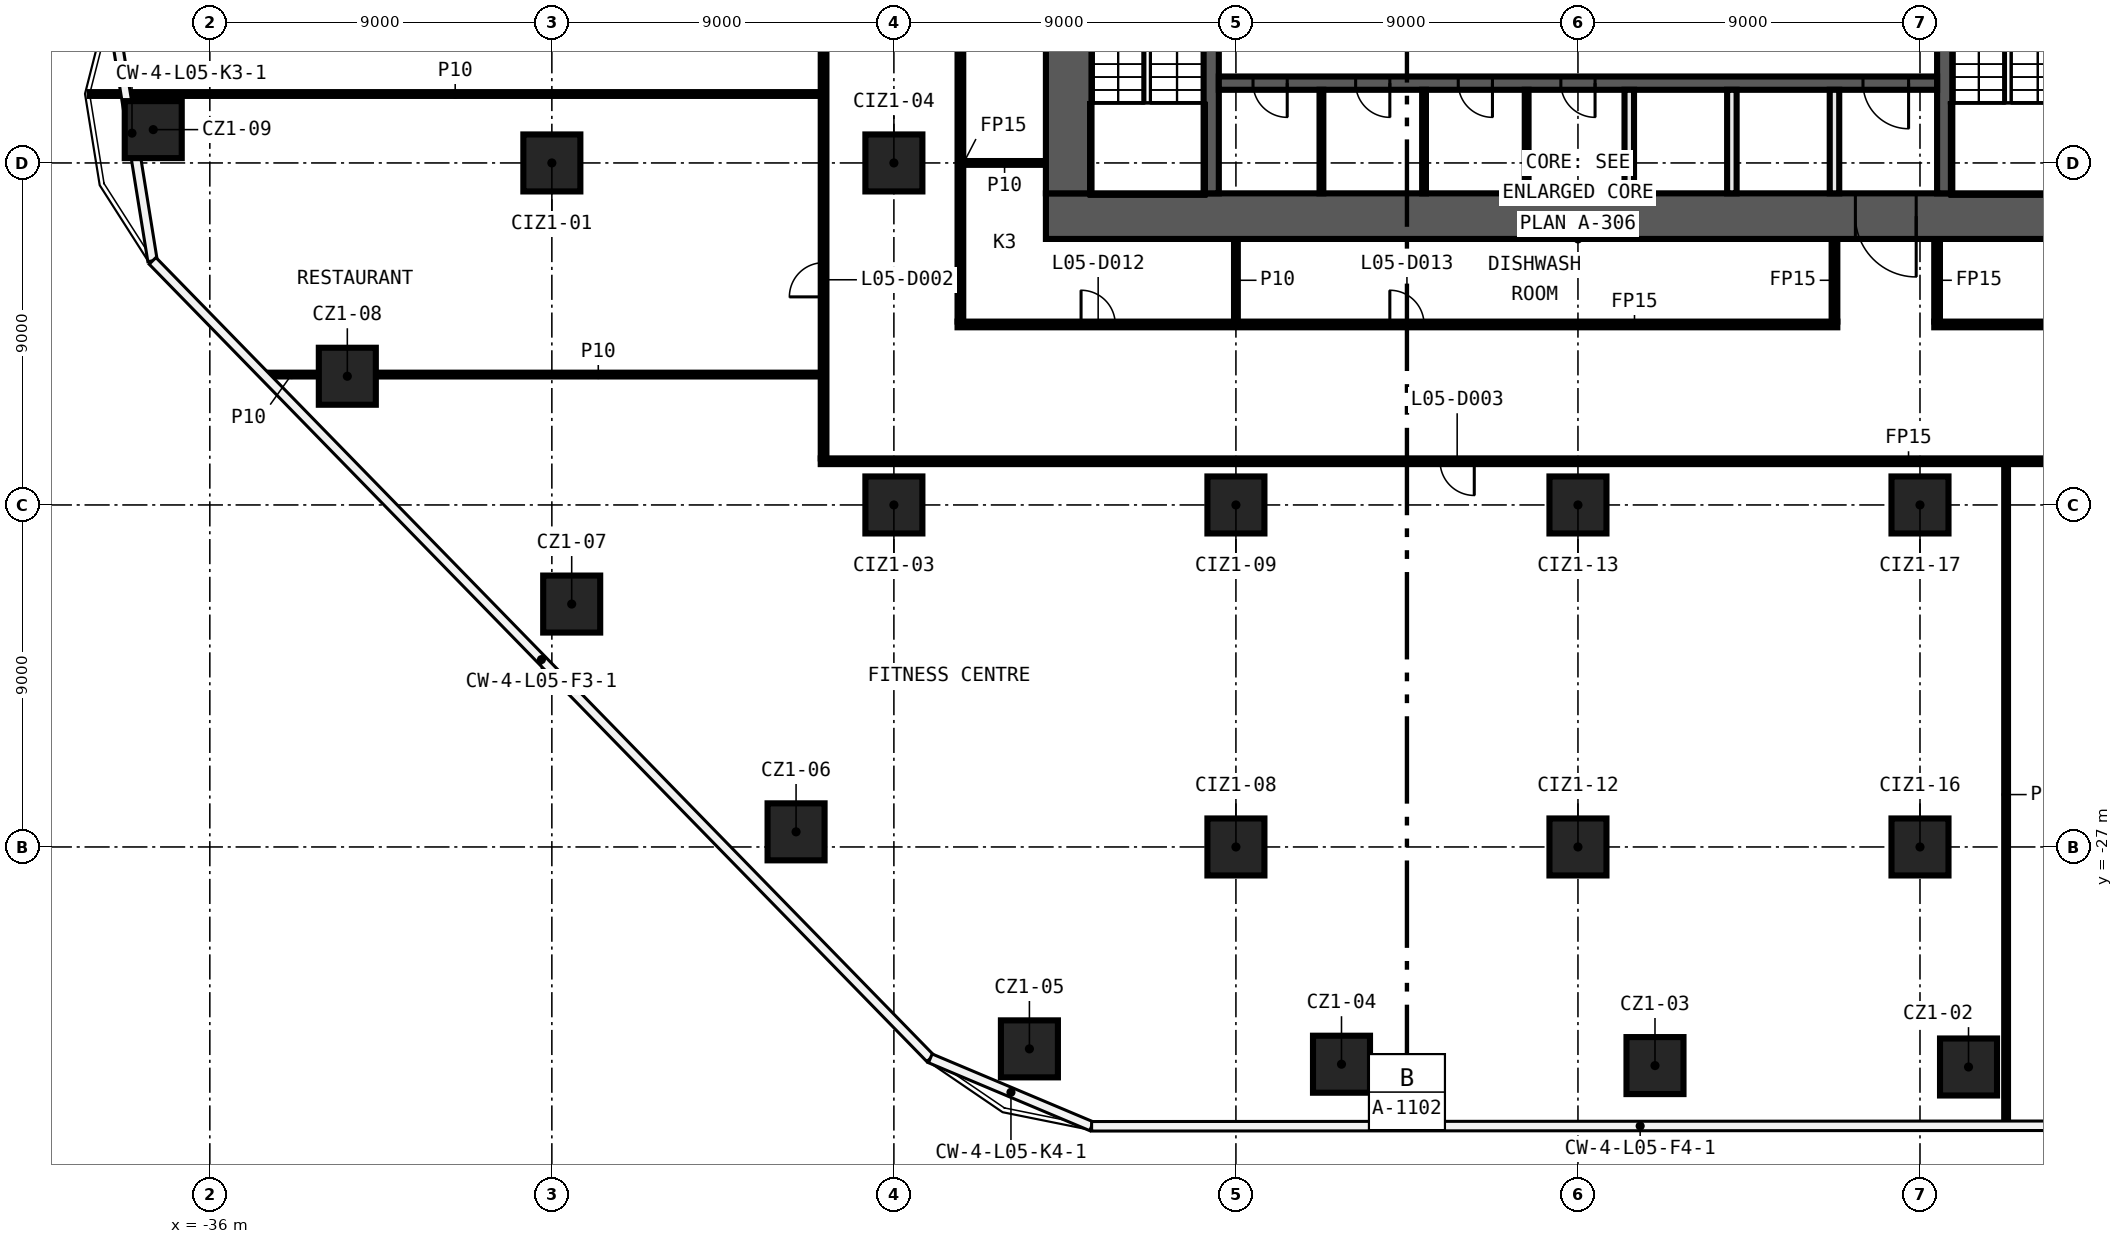
"""IFC4 building model, lengths in metres.
Left out: names, types, materials, properties, quantities, classifications, styles, units other than length and angle.
Written with IfcOpenShell. Run it as: python <this file> out.ifc"""

import sys

from ifc_helpers import new_model, si_unit, direction, frame, frame_2d, origin, origin_2d, place, context, subcontext, project, spatial, rectangle, extrude, element, fill, save


model = new_model("IFC4")
c1 = context("Model", 3, precision=1e-05, world=origin(), true_north=direction((0.0, 1.0)))
c2 = subcontext(c1, "Body", "Model", "MODEL_VIEW")
j1 = project(units=[si_unit("LENGTHUNIT", "METRE"), si_unit("PLANEANGLEUNIT", "RADIAN")], contexts=[c1])
p1 = place(None, origin())
s1 = spatial("IfcSite", under=j1, at=p1, CompositionType="ELEMENT")
p2 = place(p1, origin())
s2 = spatial("IfcBuilding", under=s1, at=p2, CompositionType="ELEMENT")
p3 = place(p2, frame((0.0, 0.0, 38.0)))
s3 = spatial("IfcBuildingStorey", under=s2, at=p3, CompositionType="ELEMENT", Elevation=38.0)
for number, where, z_axis, x_axis in (
    (1, (10.277, -32.79, 0.0), (0.0, 0.0, 1.0), (1.0, 0.0, 0.0)),
    (2, (2.027, -32.753, 0.0), (0.0, 0.0, 1.0), (1.0, 0.0, 0.0)),
    (3, (-6.222, -32.717, 0.0), (0.0, 0.0, 1.0), (1.0, 0.0, 0.0)),
    (4, (-14.434, -32.313, 0.0), (0.0, 0.0, 1.0), (1.0, 0.0, 0.0)),
    (5, (-20.574, -26.602, 0.0), (0.0, 0.0, 1.0), (1.0, 0.0, 0.0)),
    (6, (-26.478, -20.608, 0.0), (0.0, 0.0, 1.0), (1.0, 0.0, 0.0)),
    (7, (-32.382, -14.613, 0.0), (0.0, 0.0, 1.0), (1.0, 0.0, 0.0)),
    (8, (-37.489, -8.123, 0.0), (0.0, 0.0, 1.0), (1.0, 0.0, 0.0)),
    (9, (-27.0, -9.0, 0.0), (0.0, 0.0, 1.0), (1.0, 0.0, 0.0)),
    (10, (-18.0, -18.0, 0.0), (0.0, 0.0, 1.0), (1.0, 0.0, 0.0)),
    (11, (-18.0, -9.0, 0.0), (0.0, 0.0, 1.0), (1.0, 0.0, 0.0)),
    (12, (-9.0, -27.0, 0.0), (0.0, 0.0, 1.0), (1.0, 0.0, 0.0)),
    (13, (-9.0, -18.0, 0.0), (0.0, 0.0, 1.0), (1.0, 0.0, 0.0)),
    (14, (0.0, -27.0, 0.0), (0.0, 0.0, 1.0), (1.0, 0.0, 0.0)),
    (15, (0.0, -18.0, 0.0), (0.0, 0.0, 1.0), (1.0, 0.0, 0.0)),
    (16, (9.0, -27.0, 0.0), (0.0, 0.0, 1.0), (1.0, 0.0, 0.0)),
    (17, (9.0, -18.0, 0.0), (0.0, 0.0, 1.0), (1.0, 0.0, 0.0)),
):
    element("IfcColumn", number, at=place(p3, frame(where, z_axis=z_axis, x_axis=x_axis)), inside=s3, PredefinedType="COLUMN", context=c2, shape_type="SweptSolid", body=[
        extrude(rectangle(XDim=1.5, YDim=1.5, at=origin_2d()), origin(), (0.0, 0.0, 1.0), 5.6),
    ])
p4 = place(p3, frame((19.925, -16.85, 0.0), z_axis=(0.0, 0.0, 1.0), x_axis=(-1.0, 0.0, 0.0)))
e18 = element("IfcWall", 18, at=p4, inside=s3, PredefinedType="PARTITIONING", context=c2, shape_type="SweptSolid", body=[
    extrude(rectangle(XDim=39.85, YDim=0.15, at=frame_2d((19.925, 0.0))), origin(), (0.0, 0.0, 1.0), 5.6),
])
p5 = place(p4, frame((22.653, 0.0, 0.0)))
e19 = element("IfcOpeningElement", 19, at=p5, cuts=e18, PredefinedType="OPENING", context=c2, shape_type="SweptSolid", body=[
    extrude(rectangle(XDim=0.9, YDim=2.1, at=frame_2d((0.45, 1.05))), frame((0.0, 0.085, 0.0), z_axis=(0.0, -1.0, 0.0), x_axis=(1.0, 0.0, 0.0)), (0.0, 0.0, 1.0), 0.17),
])
p6 = place(p3, frame((-34.561, -14.569, 0.0), z_axis=(0.0, 0.0, 1.0), x_axis=(1.0, 0.0, 0.0)))
e20 = element("IfcWall", 20, at=p6, inside=s3, PredefinedType="PARTITIONING", context=c2, shape_type="SweptSolid", body=[
    extrude(rectangle(XDim=1.429, YDim=0.1, at=frame_2d((0.714, 0.0))), origin(), (0.0, 0.0, 1.0), 5.6),
])
p7 = place(p3, frame((-31.632, -14.569, 0.0), z_axis=(0.0, 0.0, 1.0), x_axis=(1.0, 0.0, 0.0)))
e21 = element("IfcWall", 21, at=p7, inside=s3, PredefinedType="PARTITIONING", context=c2, shape_type="SweptSolid", body=[
    extrude(rectangle(XDim=11.707, YDim=0.1, at=frame_2d((5.854, 0.0))), origin(), (0.0, 0.0, 1.0), 5.6),
])
p8 = place(p3, frame((-16.325, -13.25, 0.0), z_axis=(0.0, 0.0, 1.0), x_axis=(1.0, 0.0, 0.0)))
e22 = element("IfcWall", 22, at=p8, inside=s3, PredefinedType="PARTITIONING", context=c2, shape_type="SweptSolid", body=[
    extrude(rectangle(XDim=23.15, YDim=0.15, at=frame_2d((11.575, 0.0))), origin(), (0.0, 0.0, 1.0), 5.6),
])
p9 = place(p8, frame((3.25, 0.0, 0.0)))
e23 = element("IfcOpeningElement", 23, at=p9, cuts=e22, PredefinedType="OPENING", context=c2, shape_type="SweptSolid", body=[
    extrude(rectangle(XDim=0.9, YDim=2.1, at=frame_2d((0.45, 1.05))), frame((0.0, 0.085, 0.0), z_axis=(0.0, -1.0, 0.0), x_axis=(1.0, 0.0, 0.0)), (0.0, 0.0, 1.0), 0.17),
])
p10 = place(p8, frame((11.375, 0.0, 0.0)))
e24 = element("IfcOpeningElement", 24, at=p10, cuts=e22, PredefinedType="OPENING", context=c2, shape_type="SweptSolid", body=[
    extrude(rectangle(XDim=0.9, YDim=2.1, at=frame_2d((0.45, 1.05))), frame((0.0, 0.085, 0.0), z_axis=(0.0, -1.0, 0.0), x_axis=(1.0, 0.0, 0.0)), (0.0, 0.0, 1.0), 0.17),
])
p11 = place(p3, frame((9.375, -13.25, 0.0), z_axis=(0.0, 0.0, 1.0), x_axis=(1.0, 0.0, 0.0)))
e25 = element("IfcWall", 25, at=p11, inside=s3, PredefinedType="PARTITIONING", context=c2, shape_type="SweptSolid", body=[
    extrude(rectangle(XDim=6.95, YDim=0.15, at=frame_2d((3.475, 0.0))), origin(), (0.0, 0.0, 1.0), 5.6),
])
p12 = place(p3, frame((-16.175, -9.0, 0.0), z_axis=(0.0, 0.0, 1.0), x_axis=(1.0, 0.0, 0.0)))
e26 = element("IfcWall", 26, at=p12, inside=s3, PredefinedType="PARTITIONING", context=c2, shape_type="SweptSolid", body=[
    extrude(rectangle(XDim=2.175, YDim=0.1, at=frame_2d((1.087, 0.0))), origin(), (0.0, 0.0, 1.0), 5.6),
])
p13 = place(p3, frame((-39.162, -7.186, 0.0), z_axis=(0.0, 0.0, 1.0), x_axis=(1.0, 0.0, 0.0)))
e27 = element("IfcWall", 27, at=p13, inside=s3, PredefinedType="PARTITIONING", context=c2, shape_type="SweptSolid", body=[
    extrude(rectangle(XDim=19.237, YDim=0.1, at=frame_2d((9.618, 0.0))), origin(), (0.0, 0.0, 1.0), 5.6),
])
p14 = place(p3, frame((11.266, -34.318, 0.0), z_axis=(0.0, 0.0, 1.0), x_axis=(0.0, 1.0, 0.0)))
e28 = element("IfcWall", 28, at=p14, inside=s3, PredefinedType="PARTITIONING", context=c2, shape_type="SweptSolid", body=[
    extrude(rectangle(XDim=17.393, YDim=0.1, at=frame_2d((8.696, 0.0))), origin(), (0.0, 0.0, 1.0), 5.6),
])
for number, where, z_axis, x_axis in (
    (29, (9.45, -13.175, 0.0), (0.0, 0.0, 1.0), (0.0, 1.0, 0.0)),
    (30, (6.75, -13.175, 0.0), (0.0, 0.0, 1.0), (0.0, 1.0, 0.0)),
):
    element("IfcWall", number, at=place(p3, frame(where, z_axis=z_axis, x_axis=x_axis)), inside=s3, PredefinedType="PARTITIONING", context=c2, shape_type="SweptSolid", body=[
        extrude(rectangle(XDim=2.175, YDim=0.15, at=frame_2d((1.087, 0.0))), origin(), (0.0, 0.0, 1.0), 5.6),
    ])
p15 = place(p3, frame((-9.0, -13.175, 0.0), z_axis=(0.0, 0.0, 1.0), x_axis=(0.0, 1.0, 0.0)))
e31 = element("IfcWall", 31, at=p15, inside=s3, PredefinedType="PARTITIONING", context=c2, shape_type="SweptSolid", body=[
    extrude(rectangle(XDim=2.175, YDim=0.1, at=frame_2d((1.087, 0.0))), origin(), (0.0, 0.0, 1.0), 5.6),
])
p16 = place(p3, frame((-16.25, 13.175, 0.0), z_axis=(0.0, 0.0, 1.0), x_axis=(0.0, -1.0, 0.0)))
e32 = element("IfcWall", 32, at=p16, inside=s3, PredefinedType="PARTITIONING", context=c2, shape_type="SweptSolid", body=[
    extrude(rectangle(XDim=26.35, YDim=0.15, at=frame_2d((13.175, 0.0))), origin(), (0.0, 0.0, 1.0), 5.6),
])
p17 = place(p16, frame((17.225, 0.0, 0.0)))
e33 = element("IfcOpeningElement", 33, at=p17, cuts=e32, PredefinedType="OPENING", context=c2, shape_type="SweptSolid", body=[
    extrude(rectangle(XDim=0.9, YDim=2.1, at=frame_2d((0.45, 1.05))), frame((0.0, 0.085, 0.0), z_axis=(0.0, -1.0, 0.0), x_axis=(1.0, 0.0, 0.0)), (0.0, 0.0, 1.0), 0.17),
])
p18 = place(p16, frame((8.225, 0.0, 0.0)))
e34 = element("IfcOpeningElement", 34, at=p18, cuts=e32, PredefinedType="OPENING", context=c2, shape_type="SweptSolid", body=[
    extrude(rectangle(XDim=0.9, YDim=2.1, at=frame_2d((0.45, 1.05))), frame((0.0, 0.085, 0.0), z_axis=(0.0, -1.0, 0.0), x_axis=(1.0, 0.0, 0.0)), (0.0, 0.0, 1.0), 0.17),
])
p19 = place(p3, frame((-19.85, -16.775, 0.0), z_axis=(0.0, 0.0, 1.0), x_axis=(0.0, 1.0, 0.0)))
e35 = element("IfcWall", 35, at=p19, inside=s3, PredefinedType="PARTITIONING", context=c2, shape_type="SweptSolid", body=[
    extrude(rectangle(XDim=33.55, YDim=0.15, at=frame_2d((16.775, 0.0))), origin(), (0.0, 0.0, 1.0), 5.6),
])
p20 = place(p19, frame((19.392, 0.0, 0.0)))
e36 = element("IfcOpeningElement", 36, at=p20, cuts=e35, PredefinedType="OPENING", context=c2, shape_type="SweptSolid", body=[
    extrude(rectangle(XDim=0.9, YDim=2.1, at=frame_2d((0.45, 1.05))), frame((0.0, 0.085, 0.0), z_axis=(0.0, -1.0, 0.0), x_axis=(1.0, 0.0, 0.0)), (0.0, 0.0, 1.0), 0.17),
])
p21 = place(p19, frame((4.251, 0.0, 0.0)))
e37 = element("IfcOpeningElement", 37, at=p21, cuts=e35, PredefinedType="OPENING", context=c2, shape_type="SweptSolid", body=[
    extrude(rectangle(XDim=0.9, YDim=2.1, at=frame_2d((0.45, 1.05))), frame((0.0, 0.085, 0.0), z_axis=(0.0, -1.0, 0.0), x_axis=(1.0, 0.0, 0.0)), (0.0, 0.0, 1.0), 0.17),
])
p22 = place(p19, frame((28.629, 0.0, 0.0)))
e38 = element("IfcOpeningElement", 38, at=p22, cuts=e35, PredefinedType="OPENING", context=c2, shape_type="SweptSolid", body=[
    extrude(rectangle(XDim=0.9, YDim=2.1, at=frame_2d((0.45, 1.05))), frame((0.0, 0.085, 0.0), z_axis=(0.0, -1.0, 0.0), x_axis=(1.0, 0.0, 0.0)), (0.0, 0.0, 1.0), 0.17),
])
p23 = place(p3, frame((14.0, -10.4, 0.0), z_axis=(0.0, 0.0, 1.0), x_axis=(-1.0, 0.0, 0.0)))
e39 = element("IfcWall", 39, at=p23, inside=s3, PredefinedType="SHEAR", context=c2, shape_type="SweptSolid", body=[
    extrude(rectangle(XDim=28.0, YDim=1.2, at=frame_2d((14.0, 0.0))), origin(), (0.0, 0.0, 1.0), 5.6),
])
p24 = place(p23, frame((5.1, 0.0, 0.0)))
e40 = element("IfcOpeningElement", 40, at=p24, cuts=e39, PredefinedType="OPENING", context=c2, shape_type="SweptSolid", body=[
    extrude(rectangle(XDim=1.6, YDim=2.1, at=frame_2d((0.8, 1.05))), frame((0.0, 0.61, 0.0), z_axis=(0.0, -1.0, 0.0), x_axis=(1.0, 0.0, 0.0)), (0.0, 0.0, 1.0), 1.22),
])
p25 = place(p3, frame((-13.4, -9.8, 0.0), z_axis=(0.0, 0.0, 1.0), x_axis=(0.0, 1.0, 0.0)))
e41 = element("IfcWall", 41, at=p25, inside=s3, PredefinedType="SHEAR", context=c2, shape_type="SweptSolid", body=[
    extrude(rectangle(XDim=19.6, YDim=1.2, at=frame_2d((9.8, 0.0))), origin(), (0.0, 0.0, 1.0), 5.6),
])
p26 = place(p3, frame((9.65, -2.3, 0.0), z_axis=(0.0, 0.0, 1.0), x_axis=(0.0, -1.0, 0.0)))
e42 = element("IfcWall", 42, at=p26, inside=s3, PredefinedType="SHEAR", context=c2, shape_type="SweptSolid", body=[
    extrude(rectangle(XDim=7.5, YDim=0.4, at=frame_2d((3.75, 0.0))), origin(), (0.0, 0.0, 1.0), 5.6),
])
p27 = place(p26, frame((1.2, 0.0, 0.0)))
e43 = element("IfcOpeningElement", 43, at=p27, cuts=e42, PredefinedType="OPENING", context=c2, shape_type="SweptSolid", body=[
    extrude(rectangle(XDim=1.2, YDim=2.1, at=frame_2d((0.6, 1.05))), frame((0.0, 0.21, 0.0), z_axis=(0.0, -1.0, 0.0), x_axis=(1.0, 0.0, 0.0)), (0.0, 0.0, 1.0), 0.42),
])
p28 = place(p3, frame((-9.65, -9.8, 0.0), z_axis=(0.0, 0.0, 1.0), x_axis=(0.0, 1.0, 0.0)))
e44 = element("IfcWall", 44, at=p28, inside=s3, PredefinedType="SHEAR", context=c2, shape_type="SweptSolid", body=[
    extrude(rectangle(XDim=7.5, YDim=0.4, at=frame_2d((3.75, 0.0))), origin(), (0.0, 0.0, 1.0), 5.6),
])
p29 = place(p28, frame((5.1, 0.0, 0.0)))
e45 = element("IfcOpeningElement", 45, at=p29, cuts=e44, PredefinedType="OPENING", context=c2, shape_type="SweptSolid", body=[
    extrude(rectangle(XDim=1.2, YDim=2.1, at=frame_2d((0.6, 1.05))), frame((0.0, 0.21, 0.0), z_axis=(0.0, -1.0, 0.0), x_axis=(1.0, 0.0, 0.0)), (0.0, 0.0, 1.0), 0.42),
])
p30 = place(p3, frame((9.45, -6.9, 0.0), z_axis=(0.0, 0.0, 1.0), x_axis=(-1.0, 0.0, 0.0)))
e46 = element("IfcWall", 46, at=p30, inside=s3, PredefinedType="SHEAR", context=c2, shape_type="SweptSolid", body=[
    extrude(rectangle(XDim=18.9, YDim=0.35, at=frame_2d((9.45, 0.0))), origin(), (0.0, 0.0, 1.0), 5.6),
])
p31 = place(p30, frame((0.75, 0.0, 0.0)))
e47 = element("IfcOpeningElement", 47, at=p31, cuts=e46, PredefinedType="OPENING", context=c2, shape_type="SweptSolid", body=[
    extrude(rectangle(XDim=1.2, YDim=2.1, at=frame_2d((0.6, 1.05))), frame((0.0, 0.185, 0.0), z_axis=(0.0, -1.0, 0.0), x_axis=(1.0, 0.0, 0.0)), (0.0, 0.0, 1.0), 0.37),
])
p32 = place(p30, frame((17.1, 0.0, 0.0)))
e48 = element("IfcOpeningElement", 48, at=p32, cuts=e46, PredefinedType="OPENING", context=c2, shape_type="SweptSolid", body=[
    extrude(rectangle(XDim=0.9, YDim=2.1, at=frame_2d((0.45, 1.05))), frame((0.0, 0.185, 0.0), z_axis=(0.0, -1.0, 0.0), x_axis=(1.0, 0.0, 0.0)), (0.0, 0.0, 1.0), 0.37),
])
p33 = place(p30, frame((14.4, 0.0, 0.0)))
e49 = element("IfcOpeningElement", 49, at=p33, cuts=e46, PredefinedType="OPENING", context=c2, shape_type="SweptSolid", body=[
    extrude(rectangle(XDim=0.9, YDim=2.1, at=frame_2d((0.45, 1.05))), frame((0.0, 0.185, 0.0), z_axis=(0.0, -1.0, 0.0), x_axis=(1.0, 0.0, 0.0)), (0.0, 0.0, 1.0), 0.37),
])
p34 = place(p30, frame((11.7, 0.0, 0.0)))
e50 = element("IfcOpeningElement", 50, at=p34, cuts=e46, PredefinedType="OPENING", context=c2, shape_type="SweptSolid", body=[
    extrude(rectangle(XDim=0.9, YDim=2.1, at=frame_2d((0.45, 1.05))), frame((0.0, 0.185, 0.0), z_axis=(0.0, -1.0, 0.0), x_axis=(1.0, 0.0, 0.0)), (0.0, 0.0, 1.0), 0.37),
])
p35 = place(p30, frame((9.0, 0.0, 0.0)))
e51 = element("IfcOpeningElement", 51, at=p35, cuts=e46, PredefinedType="OPENING", context=c2, shape_type="SweptSolid", body=[
    extrude(rectangle(XDim=0.9, YDim=2.1, at=frame_2d((0.45, 1.05))), frame((0.0, 0.185, 0.0), z_axis=(0.0, -1.0, 0.0), x_axis=(1.0, 0.0, 0.0)), (0.0, 0.0, 1.0), 0.37),
])
for number, where, z_axis, x_axis in (
    (52, (6.75, -9.8, 0.0), (0.0, 0.0, 1.0), (0.0, 1.0, 0.0)),
    (53, (4.05, -9.8, 0.0), (0.0, 0.0, 1.0), (0.0, 1.0, 0.0)),
    (54, (1.35, -9.8, 0.0), (0.0, 0.0, 1.0), (0.0, 1.0, 0.0)),
):
    element("IfcWall", number, at=place(p3, frame(where, z_axis=z_axis, x_axis=x_axis)), inside=s3, PredefinedType="SOLIDWALL", context=c2, shape_type="SweptSolid", body=[
        extrude(rectangle(XDim=2.725, YDim=0.25, at=frame_2d((1.363, 0.0))), origin(), (0.0, 0.0, 1.0), 5.6),
    ])
for number, where, z_axis, x_axis in (
    (55, (-1.35, -9.8, 0.0), (0.0, 0.0, 1.0), (0.0, 1.0, 0.0)),
    (56, (-4.05, -9.8, 0.0), (0.0, 0.0, 1.0), (0.0, 1.0, 0.0)),
    (57, (-6.75, -9.8, 0.0), (0.0, 0.0, 1.0), (0.0, 1.0, 0.0)),
):
    element("IfcWall", number, at=place(p3, frame(where, z_axis=z_axis, x_axis=x_axis)), inside=s3, PredefinedType="PARTITIONING", context=c2, shape_type="SweptSolid", body=[
        extrude(rectangle(XDim=2.725, YDim=0.1, at=frame_2d((1.363, 0.0))), origin(), (0.0, 0.0, 1.0), 5.6),
    ])
p36 = place(p21, origin())
e58 = element("IfcDoor", 58, at=p36, inside=s3, OperationType="SINGLE_SWING_LEFT", PredefinedType="DOOR", context=c2, shape_type="SweptSolid", body=[
    extrude(rectangle(XDim=0.9, YDim=2.1, at=frame_2d((0.45, 1.05))), frame((0.0, 0.025, 0.0), z_axis=(0.0, -1.0, 0.0), x_axis=(1.0, 0.0, 0.0)), (0.0, 0.0, 1.0), 0.05),
])
fill(e37, e58)
p37 = place(p5, origin())
e59 = element("IfcDoor", 59, at=p37, inside=s3, OperationType="SINGLE_SWING_RIGHT", PredefinedType="DOOR", context=c2, shape_type="SweptSolid", body=[
    extrude(rectangle(XDim=0.9, YDim=2.1, at=frame_2d((0.45, 1.05))), frame((0.0, 0.025, 0.0), z_axis=(0.0, -1.0, 0.0), x_axis=(1.0, 0.0, 0.0)), (0.0, 0.0, 1.0), 0.05),
])
fill(e19, e59)
p38 = place(p9, origin())
e60 = element("IfcDoor", 60, at=p38, inside=s3, OperationType="SINGLE_SWING_LEFT", PredefinedType="DOOR", context=c2, shape_type="SweptSolid", body=[
    extrude(rectangle(XDim=0.9, YDim=2.1, at=frame_2d((0.45, 1.05))), frame((0.0, 0.025, 0.0), z_axis=(0.0, -1.0, 0.0), x_axis=(1.0, 0.0, 0.0)), (0.0, 0.0, 1.0), 0.05),
])
fill(e23, e60)
p39 = place(p10, origin())
e61 = element("IfcDoor", 61, at=p39, inside=s3, OperationType="SINGLE_SWING_RIGHT", PredefinedType="DOOR", context=c2, shape_type="SweptSolid", body=[
    extrude(rectangle(XDim=0.9, YDim=2.1, at=frame_2d((0.45, 1.05))), frame((0.0, 0.025, 0.0), z_axis=(0.0, -1.0, 0.0), x_axis=(1.0, 0.0, 0.0)), (0.0, 0.0, 1.0), 0.05),
])
fill(e24, e61)
p40 = place(p24, origin())
e62 = element("IfcDoor", 62, at=p40, inside=s3, OperationType="DOUBLE_DOOR_SINGLE_SWING", PredefinedType="DOOR", context=c2, shape_type="SweptSolid", body=[
    extrude(rectangle(XDim=1.6, YDim=2.1, at=frame_2d((0.8, 1.05))), frame((0.0, 0.025, 0.0), z_axis=(0.0, -1.0, 0.0), x_axis=(1.0, 0.0, 0.0)), (0.0, 0.0, 1.0), 0.05),
])
fill(e40, e62)
p41 = place(p31, origin())
e63 = element("IfcDoor", 63, at=p41, inside=s3, OperationType="SINGLE_SWING_LEFT", PredefinedType="DOOR", context=c2, shape_type="SweptSolid", body=[
    extrude(rectangle(XDim=1.2, YDim=2.1, at=frame_2d((0.6, 1.05))), frame((0.0, 0.025, 0.0), z_axis=(0.0, -1.0, 0.0), x_axis=(1.0, 0.0, 0.0)), (0.0, 0.0, 1.0), 0.05),
])
fill(e47, e63)
p42 = place(p32, origin())
e64 = element("IfcDoor", 64, at=p42, inside=s3, OperationType="SINGLE_SWING_RIGHT", PredefinedType="DOOR", context=c2, shape_type="SweptSolid", body=[
    extrude(rectangle(XDim=0.9, YDim=2.1, at=frame_2d((0.45, 1.05))), frame((0.0, 0.025, 0.0), z_axis=(0.0, -1.0, 0.0), x_axis=(1.0, 0.0, 0.0)), (0.0, 0.0, 1.0), 0.05),
])
fill(e48, e64)
p43 = place(p33, origin())
e65 = element("IfcDoor", 65, at=p43, inside=s3, OperationType="SINGLE_SWING_LEFT", PredefinedType="DOOR", context=c2, shape_type="SweptSolid", body=[
    extrude(rectangle(XDim=0.9, YDim=2.1, at=frame_2d((0.45, 1.05))), frame((0.0, 0.025, 0.0), z_axis=(0.0, -1.0, 0.0), x_axis=(1.0, 0.0, 0.0)), (0.0, 0.0, 1.0), 0.05),
])
fill(e49, e65)
p44 = place(p34, origin())
e66 = element("IfcDoor", 66, at=p44, inside=s3, OperationType="SINGLE_SWING_RIGHT", PredefinedType="DOOR", context=c2, shape_type="SweptSolid", body=[
    extrude(rectangle(XDim=0.9, YDim=2.1, at=frame_2d((0.45, 1.05))), frame((0.0, 0.025, 0.0), z_axis=(0.0, -1.0, 0.0), x_axis=(1.0, 0.0, 0.0)), (0.0, 0.0, 1.0), 0.05),
])
fill(e50, e66)
p45 = place(p35, origin())
e67 = element("IfcDoor", 67, at=p45, inside=s3, OperationType="SINGLE_SWING_LEFT", PredefinedType="DOOR", context=c2, shape_type="SweptSolid", body=[
    extrude(rectangle(XDim=0.9, YDim=2.1, at=frame_2d((0.45, 1.05))), frame((0.0, 0.025, 0.0), z_axis=(0.0, -1.0, 0.0), x_axis=(1.0, 0.0, 0.0)), (0.0, 0.0, 1.0), 0.05),
])
fill(e51, e67)
save(model, sys.argv[1])
